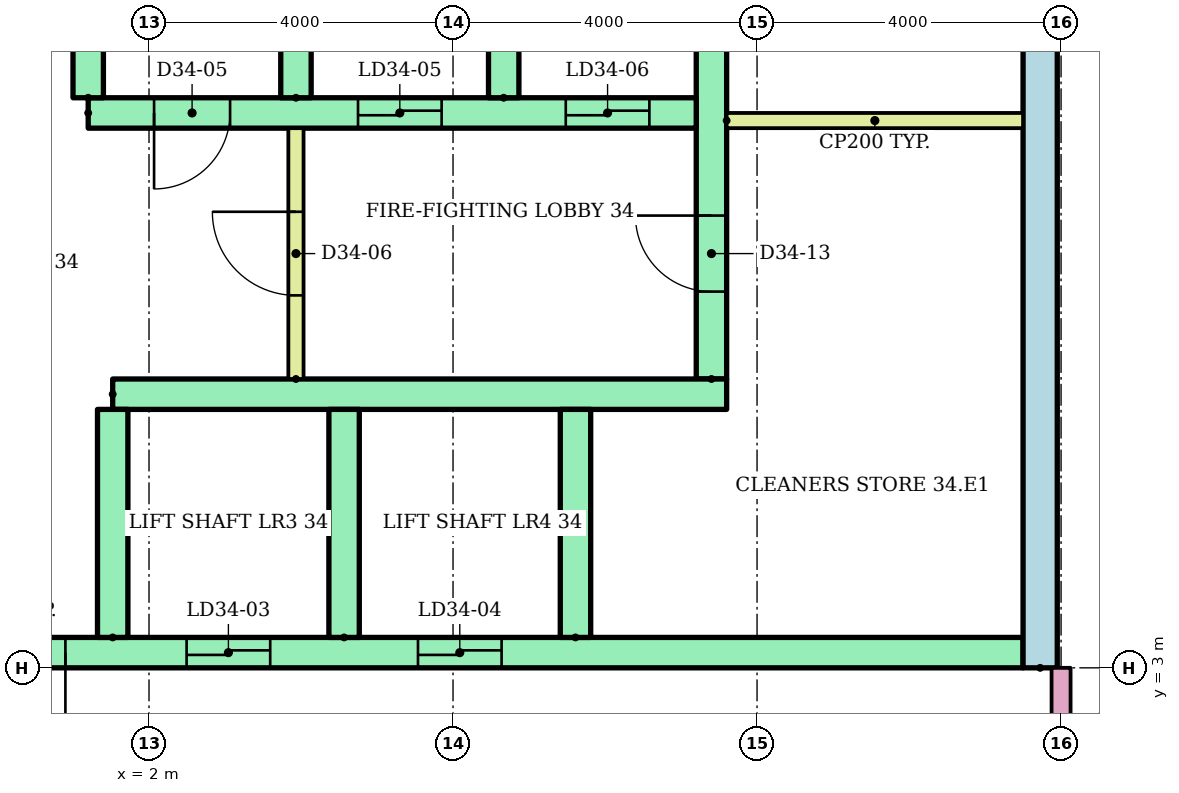
"""IFC4 building model, lengths in metres.
Left out: names, types, materials, properties, quantities, classifications, styles, units other than length and angle.
Written with IfcOpenShell. Run it as: python <this file> out.ifc"""

import sys

from ifc_helpers import new_model, si_unit, direction, frame, frame_2d, origin, place, context, subcontext, project, spatial, rectangle, extrude, element, fill, save


model = new_model("IFC4")
c1 = context("Model", 3, precision=1e-05, world=origin(), true_north=direction((0.0, 1.0)))
c2 = subcontext(c1, "Body", "Model", "MODEL_VIEW")
j1 = project(units=[si_unit("LENGTHUNIT", "METRE"), si_unit("PLANEANGLEUNIT", "RADIAN")], contexts=[c1])
p1 = place(None, origin())
s1 = spatial("IfcSite", under=j1, at=p1, CompositionType="ELEMENT")
p2 = place(p1, origin())
s2 = spatial("IfcBuilding", under=s1, at=p2, CompositionType="ELEMENT")
p3 = place(p2, frame((0.0, 0.0, 132.6)))
s3 = spatial("IfcBuildingStorey", under=s2, at=p3, CompositionType="ELEMENT", Elevation=132.6)
p4 = place(p3, frame((13.725, 3.0, 0.0), z_axis=(0.0, 0.0, 1.0), x_axis=(0.0, 1.0, 0.0)))
e1 = element("IfcWall", 1, at=p4, inside=s3, PredefinedType="SHEAR", context=c2, shape_type="SweptSolid", body=[
    extrude(rectangle(XDim=17.0, YDim=0.45, at=frame_2d((8.5, 0.0))), origin(), (0.0, 0.0, 1.0), 2.92),
])
p5 = place(p3, frame((9.4, 6.8, 0.0), z_axis=(0.0, 0.0, 1.0), x_axis=(0.0, 1.0, 0.0)))
e2 = element("IfcWall", 2, at=p5, inside=s3, PredefinedType="SHEAR", context=c2, shape_type="SweptSolid", body=[
    extrude(rectangle(XDim=12.7, YDim=0.4, at=frame_2d((6.35, 0.0))), origin(), (0.0, 0.0, 1.0), 2.92),
])
p6 = place(p5, frame((1.15, 0.0, 0.0)))
e3 = element("IfcOpeningElement", 3, at=p6, cuts=e2, PredefinedType="OPENING", context=c2, shape_type="SweptSolid", body=[
    extrude(rectangle(XDim=1.0, YDim=2.1, at=frame_2d((0.5, 1.05))), frame((0.0, 0.21, 0.0), z_axis=(0.0, -1.0, 0.0), x_axis=(1.0, 0.0, 0.0)), (0.0, 0.0, 1.0), 0.42),
])
p7 = place(p5, frame((7.925, 0.0, 0.0)))
e4 = element("IfcOpeningElement", 4, at=p7, cuts=e2, PredefinedType="OPENING", context=c2, shape_type="SweptSolid", body=[
    extrude(rectangle(XDim=1.0, YDim=2.1, at=frame_2d((0.5, 1.05))), frame((0.0, 0.21, 0.0), z_axis=(0.0, -1.0, 0.0), x_axis=(1.0, 0.0, 0.0)), (0.0, 0.0, 1.0), 0.42),
])
p8 = place(p3, frame((-13.5, 3.2, 0.0)))
e5 = element("IfcWall", 5, at=p8, inside=s3, PredefinedType="SHEAR", context=c2, shape_type="SweptSolid", body=[
    extrude(rectangle(XDim=27.0, YDim=0.4, at=frame_2d((13.5, 0.0))), origin(), (0.0, 0.0, 1.0), 2.92),
])
p9 = place(p8, frame((6.861, 0.0, 0.0)))
e6 = element("IfcOpeningElement", 6, at=p9, cuts=e5, PredefinedType="OPENING", context=c2, shape_type="SweptSolid", body=[
    extrude(rectangle(XDim=1.1, YDim=2.1, at=frame_2d((0.55, 1.05))), frame((0.0, 0.21, 0.0), z_axis=(0.0, -1.0, 0.0), x_axis=(1.0, 0.0, 0.0)), (0.0, 0.0, 1.0), 0.42),
])
p10 = place(p8, frame((9.906, 0.0, 0.0)))
e7 = element("IfcOpeningElement", 7, at=p10, cuts=e5, PredefinedType="OPENING", context=c2, shape_type="SweptSolid", body=[
    extrude(rectangle(XDim=1.1, YDim=2.1, at=frame_2d((0.55, 1.05))), frame((0.0, 0.21, 0.0), z_axis=(0.0, -1.0, 0.0), x_axis=(1.0, 0.0, 0.0)), (0.0, 0.0, 1.0), 0.42),
])
p11 = place(p8, frame((15.994, 0.0, 0.0)))
e8 = element("IfcOpeningElement", 8, at=p11, cuts=e5, PredefinedType="OPENING", context=c2, shape_type="SweptSolid", body=[
    extrude(rectangle(XDim=1.1, YDim=2.1, at=frame_2d((0.55, 1.05))), frame((0.0, 0.21, 0.0), z_axis=(0.0, -1.0, 0.0), x_axis=(1.0, 0.0, 0.0)), (0.0, 0.0, 1.0), 0.42),
])
p12 = place(p8, frame((19.039, 0.0, 0.0)))
e9 = element("IfcOpeningElement", 9, at=p12, cuts=e5, PredefinedType="OPENING", context=c2, shape_type="SweptSolid", body=[
    extrude(rectangle(XDim=1.1, YDim=2.1, at=frame_2d((0.55, 1.05))), frame((0.0, 0.21, 0.0), z_axis=(0.0, -1.0, 0.0), x_axis=(1.0, 0.0, 0.0)), (0.0, 0.0, 1.0), 0.42),
])
p13 = place(p8, frame((12.6, 0.0, 0.0)))
e10 = element("IfcOpeningElement", 10, at=p13, cuts=e5, PredefinedType="OPENING", context=c2, shape_type="SweptSolid", body=[
    extrude(rectangle(XDim=1.8, YDim=2.1, at=frame_2d((0.9, 1.05))), frame((0.0, 0.21, 0.0), z_axis=(0.0, -1.0, 0.0), x_axis=(1.0, 0.0, 0.0)), (0.0, 0.0, 1.0), 0.42),
])
p14 = place(p3, frame((1.522, 6.6, 0.0)))
e11 = element("IfcWall", 11, at=p14, inside=s3, PredefinedType="SHEAR", context=c2, shape_type="SweptSolid", body=[
    extrude(rectangle(XDim=8.078, YDim=0.4, at=frame_2d((4.039, 0.0))), origin(), (0.0, 0.0, 1.0), 2.92),
])
for number, where, z_axis, x_axis in (
    (12, (1.522, 3.4, 0.0), (0.0, 0.0, 1.0), (0.0, 1.0, 0.0)),
    (13, (4.567, 3.4, 0.0), (0.0, 0.0, 1.0), (0.0, 1.0, 0.0)),
    (14, (7.611, 3.4, 0.0), (0.0, 0.0, 1.0), (0.0, 1.0, 0.0)),
):
    element("IfcWall", number, at=place(p3, frame(where, z_axis=z_axis, x_axis=x_axis)), inside=s3, PredefinedType="SHEAR", context=c2, shape_type="SweptSolid", body=[
        extrude(rectangle(XDim=3.0, YDim=0.4, at=frame_2d((1.5, 0.0))), origin(), (0.0, 0.0, 1.0), 2.92),
    ])
p15 = place(p3, frame((1.2, 10.3, 0.0)))
e15 = element("IfcWall", 15, at=p15, inside=s3, PredefinedType="SHEAR", context=c2, shape_type="SweptSolid", body=[
    extrude(rectangle(XDim=8.0, YDim=0.4, at=frame_2d((4.0, 0.0))), origin(), (0.0, 0.0, 1.0), 2.92),
])
p16 = place(p15, frame((3.55, 0.0, 0.0)))
e16 = element("IfcOpeningElement", 16, at=p16, cuts=e15, PredefinedType="OPENING", context=c2, shape_type="SweptSolid", body=[
    extrude(rectangle(XDim=1.1, YDim=2.1, at=frame_2d((0.55, 1.05))), frame((0.0, 0.21, 0.0), z_axis=(0.0, -1.0, 0.0), x_axis=(1.0, 0.0, 0.0)), (0.0, 0.0, 1.0), 0.42),
])
p17 = place(p15, frame((6.283, 0.0, 0.0)))
e17 = element("IfcOpeningElement", 17, at=p17, cuts=e15, PredefinedType="OPENING", context=c2, shape_type="SweptSolid", body=[
    extrude(rectangle(XDim=1.1, YDim=2.1, at=frame_2d((0.55, 1.05))), frame((0.0, 0.21, 0.0), z_axis=(0.0, -1.0, 0.0), x_axis=(1.0, 0.0, 0.0)), (0.0, 0.0, 1.0), 0.42),
])
p18 = place(p15, frame((0.867, 0.0, 0.0)))
e18 = element("IfcOpeningElement", 18, at=p18, cuts=e15, PredefinedType="OPENING", context=c2, shape_type="SweptSolid", body=[
    extrude(rectangle(XDim=1.0, YDim=2.1, at=frame_2d((0.5, 1.05))), frame((0.0, 0.21, 0.0), z_axis=(0.0, -1.0, 0.0), x_axis=(1.0, 0.0, 0.0)), (0.0, 0.0, 1.0), 0.42),
])
for number, where, z_axis, x_axis in (
    (19, (1.2, 10.5, 0.0), (0.0, 0.0, 1.0), (0.0, 1.0, 0.0)),
    (20, (3.933, 10.5, 0.0), (0.0, 0.0, 1.0), (0.0, 1.0, 0.0)),
    (21, (6.667, 10.5, 0.0), (0.0, 0.0, 1.0), (0.0, 1.0, 0.0)),
):
    element("IfcWall", number, at=place(p3, frame(where, z_axis=z_axis, x_axis=x_axis)), inside=s3, PredefinedType="SHEAR", context=c2, shape_type="SweptSolid", body=[
        extrude(rectangle(XDim=3.0, YDim=0.4, at=frame_2d((1.5, 0.0))), origin(), (0.0, 0.0, 1.0), 2.92),
    ])
p19 = place(p3, frame((3.933, 6.8, 0.0), z_axis=(0.0, 0.0, 1.0), x_axis=(0.0, 1.0, 0.0)))
e22 = element("IfcWall", 22, at=p19, inside=s3, PredefinedType="PARTITIONING", context=c2, shape_type="SweptSolid", body=[
    extrude(rectangle(XDim=3.3, YDim=0.2, at=frame_2d((1.65, 0.0))), origin(), (0.0, 0.0, 1.0), 2.92),
])
p20 = place(p19, frame((1.1, 0.0, 0.0)))
e23 = element("IfcOpeningElement", 23, at=p20, cuts=e22, PredefinedType="OPENING", context=c2, shape_type="SweptSolid", body=[
    extrude(rectangle(XDim=1.1, YDim=2.1, at=frame_2d((0.55, 1.05))), frame((0.0, 0.11, 0.0), z_axis=(0.0, -1.0, 0.0), x_axis=(1.0, 0.0, 0.0)), (0.0, 0.0, 1.0), 0.22),
])
p21 = place(p3, frame((9.6, 10.2, 0.0)))
e24 = element("IfcWall", 24, at=p21, inside=s3, PredefinedType="PARTITIONING", context=c2, shape_type="SweptSolid", body=[
    extrude(rectangle(XDim=3.9, YDim=0.2, at=frame_2d((1.95, 0.0))), origin(), (0.0, 0.0, 1.0), 2.92),
])
p22 = place(p3, frame((14.0, 1.4, 0.0), z_axis=(0.0, 0.0, 1.0), x_axis=(0.0, 1.0, 0.0)))
e25 = element("IfcWall", 25, at=p22, inside=s3, PredefinedType="PARTITIONING", context=c2, shape_type="SweptSolid", body=[
    extrude(rectangle(XDim=1.6, YDim=0.25, at=frame_2d((0.8, 0.0))), origin(), (0.0, 0.0, 1.0), 2.4),
])
p23 = place(p11, origin())
e26 = element("IfcDoor", 26, at=p23, inside=s3, OperationType="SLIDING_TO_LEFT", PredefinedType="DOOR", context=c2, shape_type="SweptSolid", body=[
    extrude(rectangle(XDim=1.1, YDim=2.1, at=frame_2d((0.55, 1.05))), frame((0.0, 0.025, 0.0), z_axis=(0.0, -1.0, 0.0), x_axis=(1.0, 0.0, 0.0)), (0.0, 0.0, 1.0), 0.05),
])
fill(e8, e26)
p24 = place(p12, origin())
e27 = element("IfcDoor", 27, at=p24, inside=s3, OperationType="SLIDING_TO_LEFT", PredefinedType="DOOR", context=c2, shape_type="SweptSolid", body=[
    extrude(rectangle(XDim=1.1, YDim=2.1, at=frame_2d((0.55, 1.05))), frame((0.0, 0.025, 0.0), z_axis=(0.0, -1.0, 0.0), x_axis=(1.0, 0.0, 0.0)), (0.0, 0.0, 1.0), 0.05),
])
fill(e9, e27)
p25 = place(p13, frame((1.8, 0.0, 0.0), z_axis=(0.0, 0.0, 1.0), x_axis=(-1.0, 0.0, 0.0)))
e28 = element("IfcDoor", 28, at=p25, inside=s3, OperationType="DOUBLE_DOOR_SINGLE_SWING", PredefinedType="DOOR", context=c2, shape_type="SweptSolid", body=[
    extrude(rectangle(XDim=1.8, YDim=2.1, at=frame_2d((0.9, 1.05))), frame((0.0, 0.025, 0.0), z_axis=(0.0, -1.0, 0.0), x_axis=(1.0, 0.0, 0.0)), (0.0, 0.0, 1.0), 0.05),
])
fill(e10, e28)
p26 = place(p16, origin())
e29 = element("IfcDoor", 29, at=p26, inside=s3, OperationType="SLIDING_TO_LEFT", PredefinedType="DOOR", context=c2, shape_type="SweptSolid", body=[
    extrude(rectangle(XDim=1.1, YDim=2.1, at=frame_2d((0.55, 1.05))), frame((0.0, 0.025, 0.0), z_axis=(0.0, -1.0, 0.0), x_axis=(1.0, 0.0, 0.0)), (0.0, 0.0, 1.0), 0.05),
])
fill(e16, e29)
p27 = place(p17, origin())
e30 = element("IfcDoor", 30, at=p27, inside=s3, OperationType="SLIDING_TO_LEFT", PredefinedType="DOOR", context=c2, shape_type="SweptSolid", body=[
    extrude(rectangle(XDim=1.1, YDim=2.1, at=frame_2d((0.55, 1.05))), frame((0.0, 0.025, 0.0), z_axis=(0.0, -1.0, 0.0), x_axis=(1.0, 0.0, 0.0)), (0.0, 0.0, 1.0), 0.05),
])
fill(e17, e30)
p28 = place(p18, frame((1.0, 0.0, 0.0), z_axis=(0.0, 0.0, 1.0), x_axis=(-1.0, 0.0, 0.0)))
e31 = element("IfcDoor", 31, at=p28, inside=s3, OperationType="SINGLE_SWING_LEFT", PredefinedType="DOOR", context=c2, shape_type="SweptSolid", body=[
    extrude(rectangle(XDim=1.0, YDim=2.1, at=frame_2d((0.5, 1.05))), frame((0.0, 0.025, 0.0), z_axis=(0.0, -1.0, 0.0), x_axis=(1.0, 0.0, 0.0)), (0.0, 0.0, 1.0), 0.05),
])
fill(e18, e31)
p29 = place(p20, origin())
e32 = element("IfcDoor", 32, at=p29, inside=s3, OperationType="SINGLE_SWING_RIGHT", PredefinedType="DOOR", context=c2, shape_type="SweptSolid", body=[
    extrude(rectangle(XDim=1.1, YDim=2.1, at=frame_2d((0.55, 1.05))), frame((0.0, 0.025, 0.0), z_axis=(0.0, -1.0, 0.0), x_axis=(1.0, 0.0, 0.0)), (0.0, 0.0, 1.0), 0.05),
])
fill(e23, e32)
p30 = place(p6, origin())
e33 = element("IfcDoor", 33, at=p30, inside=s3, OperationType="SINGLE_SWING_RIGHT", PredefinedType="DOOR", context=c2, shape_type="SweptSolid", body=[
    extrude(rectangle(XDim=1.0, YDim=2.1, at=frame_2d((0.5, 1.05))), frame((0.0, 0.025, 0.0), z_axis=(0.0, -1.0, 0.0), x_axis=(1.0, 0.0, 0.0)), (0.0, 0.0, 1.0), 0.05),
])
fill(e3, e33)
save(model, sys.argv[1])
